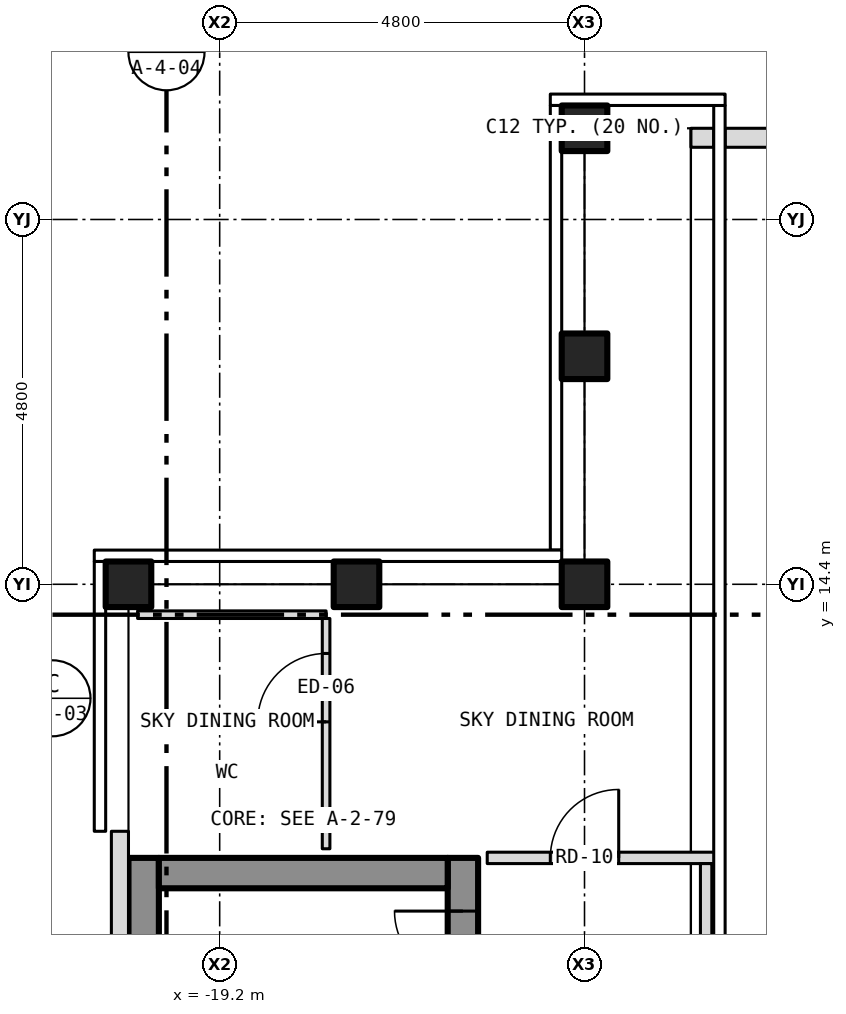
"""IFC4 building model, lengths in metres.
Left out: names, types, materials, properties, quantities, classifications, styles, units other than length and angle.
Written with IfcOpenShell. Run it as: python <this file> out.ifc"""

import sys

from ifc_helpers import new_model, si_unit, direction, frame, frame_2d, origin, origin_2d, place, context, subcontext, project, spatial, rectangle, hollow_rectangle, extrude, element, fill, save


model = new_model("IFC4")
c1 = context("Model", 3, precision=1e-05, world=origin(), true_north=direction((0.0, 1.0)))
c2 = subcontext(c1, "Body", "Model", "MODEL_VIEW")
j1 = project(units=[si_unit("LENGTHUNIT", "METRE"), si_unit("PLANEANGLEUNIT", "RADIAN")], contexts=[c1])
p1 = place(None, origin())
s1 = spatial("IfcSite", under=j1, at=p1, CompositionType="ELEMENT")
p2 = place(p1, origin())
s2 = spatial("IfcBuilding", under=s1, at=p2, CompositionType="ELEMENT")
p3 = place(p2, frame((0.0, 0.0, 286.5)))
s3 = spatial("IfcBuildingStorey", under=s2, at=p3, CompositionType="ELEMENT", Elevation=286.5)
for number, where, z_axis, x_axis in (
    (1, (-14.4, 20.4, -0.15), (0.0, 0.0, 1.0), (1.0, 0.0, 0.0)),
    (2, (-20.4, 14.4, -0.15), (0.0, 0.0, 1.0), (1.0, 0.0, 0.0)),
    (3, (-14.4, 14.4, -0.15), (0.0, 0.0, 1.0), (1.0, 0.0, 0.0)),
    (4, (-14.4, 17.4, -0.15), (0.0, 0.0, 1.0), (1.0, 0.0, 0.0)),
    (5, (-17.4, 14.4, -0.15), (0.0, 0.0, 1.0), (1.0, 0.0, 0.0)),
):
    element("IfcColumn", number, at=place(p3, frame(where, z_axis=z_axis, x_axis=x_axis)), inside=s3, PredefinedType="COLUMN", context=c2, shape_type="SweptSolid", body=[
        extrude(hollow_rectangle(XDim=0.6, YDim=0.6, WallThickness=0.03, at=origin_2d()), origin(), (0.0, 0.0, 1.0), 3.45),
    ])
p4 = place(p3, frame((-16.0, -10.8, 0.0), z_axis=(0.0, 0.0, 1.0), x_axis=(0.0, 1.0, 0.0)))
e6 = element("IfcWall", 6, at=p4, inside=s3, PredefinedType="SHEAR", context=c2, shape_type="SweptSolid", body=[
    extrude(rectangle(XDim=21.6, YDim=0.4, at=frame_2d((10.8, 0.0))), origin(), (0.0, 0.0, 1.0), 3.25),
])
p5 = place(p4, frame((9.4, 0.0, 0.0)))
e7 = element("IfcOpeningElement", 7, at=p5, cuts=e6, PredefinedType="OPENING", context=c2, shape_type="SweptSolid", body=[
    extrude(rectangle(XDim=1.1, YDim=2.1, at=frame_2d((0.55, 1.05))), frame((0.0, 0.212, 0.0), z_axis=(0.0, -1.0, 0.0), x_axis=(1.0, 0.0, 0.0)), (0.0, 0.0, 1.0), 0.424),
])
p6 = place(p4, frame((11.5, 0.0, 0.0)))
e8 = element("IfcOpeningElement", 8, at=p6, cuts=e6, PredefinedType="OPENING", context=c2, shape_type="SweptSolid", body=[
    extrude(rectangle(XDim=1.1, YDim=2.1, at=frame_2d((0.55, 1.05))), frame((0.0, 0.212, 0.0), z_axis=(0.0, -1.0, 0.0), x_axis=(1.0, 0.0, 0.0)), (0.0, 0.0, 1.0), 0.424),
])
p7 = place(p4, frame((13.6, 0.0, 0.0)))
e9 = element("IfcOpeningElement", 9, at=p7, cuts=e6, PredefinedType="OPENING", context=c2, shape_type="SweptSolid", body=[
    extrude(rectangle(XDim=1.1, YDim=2.1, at=frame_2d((0.55, 1.05))), frame((0.0, 0.212, 0.0), z_axis=(0.0, -1.0, 0.0), x_axis=(1.0, 0.0, 0.0)), (0.0, 0.0, 1.0), 0.424),
])
p8 = place(p4, frame((15.7, 0.0, 0.0)))
e10 = element("IfcOpeningElement", 10, at=p8, cuts=e6, PredefinedType="OPENING", context=c2, shape_type="SweptSolid", body=[
    extrude(rectangle(XDim=1.1, YDim=2.1, at=frame_2d((0.55, 1.05))), frame((0.0, 0.212, 0.0), z_axis=(0.0, -1.0, 0.0), x_axis=(1.0, 0.0, 0.0)), (0.0, 0.0, 1.0), 0.424),
])
p9 = place(p4, frame((17.8, 0.0, 0.0)))
e11 = element("IfcOpeningElement", 11, at=p9, cuts=e6, PredefinedType="OPENING", context=c2, shape_type="SweptSolid", body=[
    extrude(rectangle(XDim=1.1, YDim=2.1, at=frame_2d((0.55, 1.05))), frame((0.0, 0.212, 0.0), z_axis=(0.0, -1.0, 0.0), x_axis=(1.0, 0.0, 0.0)), (0.0, 0.0, 1.0), 0.424),
])
p10 = place(p4, frame((0.458, 0.0, 0.0)))
e12 = element("IfcOpeningElement", 12, at=p10, cuts=e6, PredefinedType="OPENING", context=c2, shape_type="SweptSolid", body=[
    extrude(rectangle(XDim=1.1, YDim=2.1, at=frame_2d((0.55, 1.05))), frame((0.0, 0.212, 0.0), z_axis=(0.0, -1.0, 0.0), x_axis=(1.0, 0.0, 0.0)), (0.0, 0.0, 1.0), 0.424),
])
p11 = place(p4, frame((7.5, 0.0, 0.0)))
e13 = element("IfcOpeningElement", 13, at=p11, cuts=e6, PredefinedType="OPENING", context=c2, shape_type="SweptSolid", body=[
    extrude(rectangle(XDim=1.1, YDim=2.1, at=frame_2d((0.55, 1.05))), frame((0.0, 0.212, 0.0), z_axis=(0.0, -1.0, 0.0), x_axis=(1.0, 0.0, 0.0)), (0.0, 0.0, 1.0), 0.424),
])
p12 = place(p4, frame((20.0, 0.0, 0.0)))
e14 = element("IfcOpeningElement", 14, at=p12, cuts=e6, PredefinedType="OPENING", context=c2, shape_type="SweptSolid", body=[
    extrude(rectangle(XDim=0.9, YDim=2.1, at=frame_2d((0.45, 1.05))), frame((0.0, 0.212, 0.0), z_axis=(0.0, -1.0, 0.0), x_axis=(1.0, 0.0, 0.0)), (0.0, 0.0, 1.0), 0.424),
])
p13 = place(p3, frame((-20.2, -10.8, 0.0), z_axis=(0.0, 0.0, 1.0), x_axis=(0.0, 1.0, 0.0)))
e15 = element("IfcWall", 15, at=p13, inside=s3, PredefinedType="SHEAR", context=c2, shape_type="SweptSolid", body=[
    extrude(rectangle(XDim=21.6, YDim=0.4, at=frame_2d((10.8, 0.0))), origin(), (0.0, 0.0, 1.0), 3.25),
])
p14 = place(p3, frame((-20.0, 10.6, 0.0), z_axis=(0.0, 0.0, 1.0), x_axis=(1.0, 0.0, 0.0)))
e16 = element("IfcWall", 16, at=p14, inside=s3, PredefinedType="SHEAR", context=c2, shape_type="SweptSolid", body=[
    extrude(rectangle(XDim=3.8, YDim=0.4, at=frame_2d((1.9, 0.0))), origin(), (0.0, 0.0, 1.0), 3.25),
])
p15 = place(p3, frame((-20.512, 11.15, 0.0), z_axis=(0.0, 0.0, 1.0), x_axis=(0.0, -1.0, 0.0)))
e17 = element("IfcWall", 17, at=p15, inside=s3, PredefinedType="SOLIDWALL", context=c2, shape_type="SweptSolid", body=[
    extrude(rectangle(XDim=22.3, YDim=0.225, at=frame_2d((11.15, 0.0))), origin(), (0.0, 0.0, 1.0), 3.5),
])
p16 = place(p15, frame((18.4, 0.0, 1.0)))
e18 = element("IfcOpeningElement", 18, at=p16, cuts=e17, PredefinedType="OPENING", context=c2, shape_type="SweptSolid", body=[
    extrude(rectangle(XDim=0.6, YDim=1.5, at=frame_2d((0.3, 0.75))), frame((0.0, 0.125, 0.0), z_axis=(0.0, -1.0, 0.0), x_axis=(1.0, 0.0, 0.0)), (0.0, 0.0, 1.0), 0.249),
])
p17 = place(p3, frame((-10.526, 20.275, 0.0), z_axis=(0.0, 0.0, 1.0), x_axis=(-1.0, 0.0, 0.0)))
e19 = element("IfcWall", 19, at=p17, inside=s3, PredefinedType="PARAPET", context=c2, shape_type="SweptSolid", body=[
    extrude(rectangle(XDim=2.024, YDim=0.25, at=frame_2d((1.012, 0.0))), origin(), (0.0, 0.0, 1.0), 1.1),
])
p18 = place(p3, frame((-12.7, 20.275, 0.0), z_axis=(0.0, 0.0, 1.0), x_axis=(-1.0, 0.0, 0.0)))
e20 = element("IfcWall", 20, at=p18, inside=s3, PredefinedType="PARAPET", context=c2, shape_type="SweptSolid", body=[
    extrude(rectangle(XDim=0.3, YDim=0.25, at=frame_2d((0.15, 0.0))), origin(), (0.0, 0.0, 1.0), 1.1),
])
p19 = place(p3, frame((-15.68, 10.8, 0.0), z_axis=(0.0, 0.0, 1.0), x_axis=(1.0, 0.0, 0.0)))
e21 = element("IfcWall", 21, at=p19, inside=s3, PredefinedType="PARTITIONING", context=c2, shape_type="SweptSolid", body=[
    extrude(rectangle(XDim=3.01, YDim=0.15, at=frame_2d((1.505, 0.0))), origin(), (0.0, 0.0, 1.0), 3.3),
])
p20 = place(p19, frame((0.83, 0.0, 0.0)))
e22 = element("IfcOpeningElement", 22, at=p20, cuts=e21, PredefinedType="OPENING", context=c2, shape_type="SweptSolid", body=[
    extrude(rectangle(XDim=0.9, YDim=2.1, at=frame_2d((0.45, 1.05))), frame((0.0, 0.087, 0.0), z_axis=(0.0, -1.0, 0.0), x_axis=(1.0, 0.0, 0.0)), (0.0, 0.0, 1.0), 0.174),
])
p21 = place(p3, frame((-20.28, 14.0, 0.0), z_axis=(0.0, 0.0, 1.0), x_axis=(1.0, 0.0, 0.0)))
e23 = element("IfcWall", 23, at=p21, inside=s3, PredefinedType="PARTITIONING", context=c2, shape_type="SweptSolid", body=[
    extrude(rectangle(XDim=2.48, YDim=0.1, at=frame_2d((1.24, 0.0))), origin(), (0.0, 0.0, 1.0), 3.3),
])
p22 = place(p3, frame((-17.8, 10.92, 0.0), z_axis=(0.0, 0.0, 1.0), x_axis=(0.0, 1.0, 0.0)))
e24 = element("IfcWall", 24, at=p22, inside=s3, PredefinedType="PARTITIONING", context=c2, shape_type="SweptSolid", body=[
    extrude(rectangle(XDim=3.03, YDim=0.1, at=frame_2d((1.515, 0.0))), origin(), (0.0, 0.0, 1.0), 3.3),
])
p23 = place(p22, frame((1.67, 0.0, 0.0)))
e25 = element("IfcOpeningElement", 25, at=p23, cuts=e24, PredefinedType="OPENING", context=c2, shape_type="SweptSolid", body=[
    extrude(rectangle(XDim=0.9, YDim=2.1, at=frame_2d((0.45, 1.05))), frame((0.0, 0.062, 0.0), z_axis=(0.0, -1.0, 0.0), x_axis=(1.0, 0.0, 0.0)), (0.0, 0.0, 1.0), 0.124),
])
p24 = place(p3, frame((-12.8, 2.4, 0.0), z_axis=(0.0, 0.0, 1.0), x_axis=(0.0, 1.0, 0.0)))
e26 = element("IfcWall", 26, at=p24, inside=s3, PredefinedType="PARTITIONING", context=c2, shape_type="SweptSolid", body=[
    extrude(rectangle(XDim=8.325, YDim=0.15, at=frame_2d((4.163, 0.0))), origin(), (0.0, 0.0, 1.0), 3.3),
])
p25 = place(p12, origin())
e27 = element("IfcDoor", 27, at=p25, inside=s3, OperationType="SINGLE_SWING_RIGHT", PredefinedType="DOOR", context=c2, shape_type="SweptSolid", body=[
    extrude(rectangle(XDim=0.9, YDim=2.1, at=frame_2d((0.45, 1.05))), frame((0.0, 0.025, 0.0), z_axis=(0.0, -1.0, 0.0), x_axis=(1.0, 0.0, 0.0)), (0.0, 0.0, 1.0), 0.05),
])
fill(e14, e27)
p26 = place(p20, origin())
e28 = element("IfcDoor", 28, at=p26, inside=s3, OperationType="SINGLE_SWING_RIGHT", PredefinedType="DOOR", context=c2, shape_type="SweptSolid", body=[
    extrude(rectangle(XDim=0.9, YDim=2.1, at=frame_2d((0.45, 1.05))), frame((0.0, 0.025, 0.0), z_axis=(0.0, -1.0, 0.0), x_axis=(1.0, 0.0, 0.0)), (0.0, 0.0, 1.0), 0.05),
])
fill(e22, e28)
p27 = place(p23, origin())
e29 = element("IfcDoor", 29, at=p27, inside=s3, OperationType="SINGLE_SWING_LEFT", PredefinedType="DOOR", context=c2, shape_type="SweptSolid", body=[
    extrude(rectangle(XDim=0.9, YDim=2.1, at=frame_2d((0.45, 1.05))), frame((0.0, 0.025, 0.0), z_axis=(0.0, -1.0, 0.0), x_axis=(1.0, 0.0, 0.0)), (0.0, 0.0, 1.0), 0.05),
])
fill(e25, e29)
save(model, sys.argv[1])
